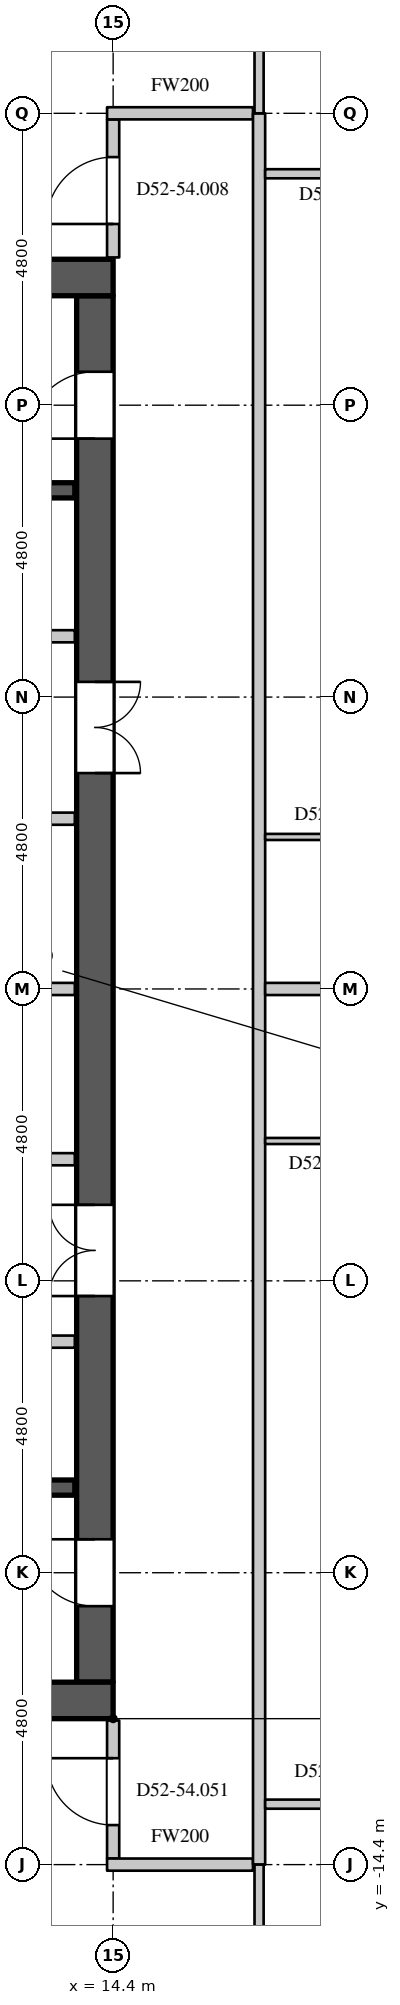
"""IFC4 building model, lengths in metres.
Left out: names, types, materials, properties, quantities, classifications, styles, units other than length and angle.
Written with IfcOpenShell. Run it as: python <this file> out.ifc"""

import sys

from ifc_helpers import new_model, si_unit, direction, frame, frame_2d, origin, place, context, subcontext, project, spatial, rectangle, extrude, element, fill, save


model = new_model("IFC4")
c1 = context("Model", 3, precision=1e-05, world=origin(), true_north=direction((0.0, 1.0)))
c2 = subcontext(c1, "Body", "Model", "MODEL_VIEW")
j1 = project(units=[si_unit("LENGTHUNIT", "METRE"), si_unit("PLANEANGLEUNIT", "RADIAN")], contexts=[c1])
p1 = place(None, origin())
s1 = spatial("IfcSite", under=j1, at=p1, CompositionType="ELEMENT")
p2 = place(p1, origin())
s2 = spatial("IfcBuilding", under=s1, at=p2, CompositionType="ELEMENT")
p3 = place(p2, frame((0.0, 0.0, 226.5)))
s3 = spatial("IfcBuildingStorey", under=s2, at=p3, CompositionType="ELEMENT", Elevation=226.5)
for number, where, z_axis, x_axis in (
    (1, (-14.4, 11.7, 0.0), (0.0, 0.0, 1.0), (1.0, 0.0, 0.0)),
    (2, (-14.4, -11.7, 0.0), (0.0, 0.0, 1.0), (1.0, 0.0, 0.0)),
):
    element("IfcWall", number, at=place(p3, frame(where, z_axis=z_axis, x_axis=x_axis)), inside=s3, PredefinedType="SHEAR", context=c2, shape_type="SweptSolid", body=[
        extrude(rectangle(XDim=28.8, YDim=0.6, at=frame_2d((14.4, 0.0))), origin(), (0.0, 0.0, 1.0), 4.2),
    ])
p4 = place(p3, frame((14.1, -11.4, 0.0), z_axis=(0.0, 0.0, 1.0), x_axis=(0.0, 1.0, 0.0)))
e3 = element("IfcWall", 3, at=p4, inside=s3, PredefinedType="SHEAR", context=c2, shape_type="SweptSolid", body=[
    extrude(rectangle(XDim=22.8, YDim=0.6, at=frame_2d((11.4, 0.0))), origin(), (0.0, 0.0, 1.0), 4.2),
])
p5 = place(p4, frame((20.45, 0.0, 0.0)))
e4 = element("IfcOpeningElement", 4, at=p5, cuts=e3, PredefinedType="OPENING", context=c2, shape_type="SweptSolid", body=[
    extrude(rectangle(XDim=1.1, YDim=2.2, at=frame_2d((0.55, 1.1))), frame((0.0, 0.31, 0.0), z_axis=(0.0, -1.0, 0.0), x_axis=(1.0, 0.0, 0.0)), (0.0, 0.0, 1.0), 0.62),
])
p6 = place(p4, frame((1.25, 0.0, 0.0)))
e5 = element("IfcOpeningElement", 5, at=p6, cuts=e3, PredefinedType="OPENING", context=c2, shape_type="SweptSolid", body=[
    extrude(rectangle(XDim=1.1, YDim=2.2, at=frame_2d((0.55, 1.1))), frame((0.0, 0.31, 0.0), z_axis=(0.0, -1.0, 0.0), x_axis=(1.0, 0.0, 0.0)), (0.0, 0.0, 1.0), 0.62),
])
p7 = place(p4, frame((14.95, 0.0, 0.0)))
e6 = element("IfcOpeningElement", 6, at=p7, cuts=e3, PredefinedType="OPENING", context=c2, shape_type="SweptSolid", body=[
    extrude(rectangle(XDim=1.5, YDim=2.4, at=frame_2d((0.75, 1.2))), frame((0.0, 0.31, 0.0), z_axis=(0.0, -1.0, 0.0), x_axis=(1.0, 0.0, 0.0)), (0.0, 0.0, 1.0), 0.62),
])
p8 = place(p4, frame((6.35, 0.0, 0.0)))
e7 = element("IfcOpeningElement", 7, at=p8, cuts=e3, PredefinedType="OPENING", context=c2, shape_type="SweptSolid", body=[
    extrude(rectangle(XDim=1.5, YDim=2.4, at=frame_2d((0.75, 1.2))), frame((0.0, 0.31, 0.0), z_axis=(0.0, -1.0, 0.0), x_axis=(1.0, 0.0, 0.0)), (0.0, 0.0, 1.0), 0.62),
])
p9 = place(p3, frame((-7.7, -5.8, 0.0), z_axis=(0.0, 0.0, 1.0), x_axis=(1.0, 0.0, 0.0)))
e8 = element("IfcWall", 8, at=p9, inside=s3, PredefinedType="PARTITIONING", context=c2, shape_type="SweptSolid", body=[
    extrude(rectangle(XDim=21.47, YDim=0.2, at=frame_2d((10.735, 0.0))), origin(), (0.0, 0.0, 1.0), 3.95),
])
p10 = place(p9, frame((6.15, 0.0, 0.0)))
e9 = element("IfcOpeningElement", 9, at=p10, cuts=e8, PredefinedType="OPENING", context=c2, shape_type="SweptSolid", body=[
    extrude(rectangle(XDim=0.9, YDim=2.2, at=frame_2d((0.45, 1.1))), frame((0.0, 0.11, 0.0), z_axis=(0.0, -1.0, 0.0), x_axis=(1.0, 0.0, 0.0)), (0.0, 0.0, 1.0), 0.22),
])
p11 = place(p9, frame((16.75, 0.0, 0.0)))
e10 = element("IfcOpeningElement", 10, at=p11, cuts=e8, PredefinedType="OPENING", context=c2, shape_type="SweptSolid", body=[
    extrude(rectangle(XDim=0.9, YDim=2.2, at=frame_2d((0.45, 1.1))), frame((0.0, 0.11, 0.0), z_axis=(0.0, -1.0, 0.0), x_axis=(1.0, 0.0, 0.0)), (0.0, 0.0, 1.0), 0.22),
])
p12 = place(p3, frame((-7.7, 5.8, 0.0), z_axis=(0.0, 0.0, 1.0), x_axis=(1.0, 0.0, 0.0)))
e11 = element("IfcWall", 11, at=p12, inside=s3, PredefinedType="PARTITIONING", context=c2, shape_type="SweptSolid", body=[
    extrude(rectangle(XDim=21.47, YDim=0.2, at=frame_2d((10.735, 0.0))), origin(), (0.0, 0.0, 1.0), 3.95),
])
p13 = place(p12, frame((3.45, 0.0, 0.0)))
e12 = element("IfcOpeningElement", 12, at=p13, cuts=e11, PredefinedType="OPENING", context=c2, shape_type="SweptSolid", body=[
    extrude(rectangle(XDim=0.9, YDim=2.2, at=frame_2d((0.45, 1.1))), frame((0.0, 0.11, 0.0), z_axis=(0.0, -1.0, 0.0), x_axis=(1.0, 0.0, 0.0)), (0.0, 0.0, 1.0), 0.22),
])
p14 = place(p12, frame((9.9, 0.0, 0.0)))
e13 = element("IfcOpeningElement", 13, at=p14, cuts=e11, PredefinedType="OPENING", context=c2, shape_type="SweptSolid", body=[
    extrude(rectangle(XDim=0.9, YDim=2.2, at=frame_2d((0.45, 1.1))), frame((0.0, 0.11, 0.0), z_axis=(0.0, -1.0, 0.0), x_axis=(1.0, 0.0, 0.0)), (0.0, 0.0, 1.0), 0.22),
])
p15 = place(p12, frame((16.75, 0.0, 0.0)))
e14 = element("IfcOpeningElement", 14, at=p15, cuts=e11, PredefinedType="OPENING", context=c2, shape_type="SweptSolid", body=[
    extrude(rectangle(XDim=0.9, YDim=2.2, at=frame_2d((0.45, 1.1))), frame((0.0, 0.11, 0.0), z_axis=(0.0, -1.0, 0.0), x_axis=(1.0, 0.0, 0.0)), (0.0, 0.0, 1.0), 0.22),
])
p16 = place(p3, frame((14.4, -14.3, 0.0), z_axis=(0.0, 0.0, 1.0), x_axis=(0.0, 1.0, 0.0)))
e15 = element("IfcWall", 15, at=p16, inside=s3, PredefinedType="PARTITIONING", context=c2, shape_type="SweptSolid", body=[
    extrude(rectangle(XDim=2.27, YDim=0.2, at=frame_2d((1.135, 0.0))), origin(), (0.0, 0.0, 1.0), 3.95),
])
p17 = place(p16, frame((0.55, 0.0, 0.0)))
e16 = element("IfcOpeningElement", 16, at=p17, cuts=e15, PredefinedType="OPENING", context=c2, shape_type="SweptSolid", body=[
    extrude(rectangle(XDim=1.1, YDim=2.4, at=frame_2d((0.55, 1.2))), frame((0.0, 0.11, 0.0), z_axis=(0.0, -1.0, 0.0), x_axis=(1.0, 0.0, 0.0)), (0.0, 0.0, 1.0), 0.22),
])
p18 = place(p3, frame((14.3, -14.4, 0.0), z_axis=(0.0, 0.0, 1.0), x_axis=(1.0, 0.0, 0.0)))
e17 = element("IfcWall", 17, at=p18, inside=s3, PredefinedType="PARTITIONING", context=c2, shape_type="SweptSolid", body=[
    extrude(rectangle(XDim=2.4, YDim=0.2, at=frame_2d((1.2, 0.0))), origin(), (0.0, 0.0, 1.0), 3.95),
])
p19 = place(p3, frame((14.4, 12.03, 0.0), z_axis=(0.0, 0.0, 1.0), x_axis=(0.0, 1.0, 0.0)))
e18 = element("IfcWall", 18, at=p19, inside=s3, PredefinedType="PARTITIONING", context=c2, shape_type="SweptSolid", body=[
    extrude(rectangle(XDim=2.27, YDim=0.2, at=frame_2d((1.135, 0.0))), origin(), (0.0, 0.0, 1.0), 3.95),
])
p20 = place(p19, frame((0.55, 0.0, 0.0)))
e19 = element("IfcOpeningElement", 19, at=p20, cuts=e18, PredefinedType="OPENING", context=c2, shape_type="SweptSolid", body=[
    extrude(rectangle(XDim=1.1, YDim=2.4, at=frame_2d((0.55, 1.2))), frame((0.0, 0.11, 0.0), z_axis=(0.0, -1.0, 0.0), x_axis=(1.0, 0.0, 0.0)), (0.0, 0.0, 1.0), 0.22),
])
p21 = place(p3, frame((14.3, 14.4, 0.0), z_axis=(0.0, 0.0, 1.0), x_axis=(1.0, 0.0, 0.0)))
e20 = element("IfcWall", 20, at=p21, inside=s3, PredefinedType="PARTITIONING", context=c2, shape_type="SweptSolid", body=[
    extrude(rectangle(XDim=2.4, YDim=0.2, at=frame_2d((1.2, 0.0))), origin(), (0.0, 0.0, 1.0), 3.95),
])
p22 = place(p3, frame((16.8, -14.4, 0.0), z_axis=(0.0, 0.0, 1.0), x_axis=(0.0, 1.0, 0.0)))
e21 = element("IfcWall", 21, at=p22, inside=s3, PredefinedType="PARTITIONING", context=c2, shape_type="SweptSolid", body=[
    extrude(rectangle(XDim=28.8, YDim=0.2, at=frame_2d((14.4, 0.0))), origin(), (0.0, 0.0, 1.0), 3.95),
])
p23 = place(p3, frame((16.8, -19.828, 0.0), z_axis=(0.0, 0.0, 1.0), x_axis=(0.0, 1.0, 0.0)))
e22 = element("IfcWall", 22, at=p23, inside=s3, PredefinedType="PARTITIONING", context=c2, shape_type="SweptSolid", body=[
    extrude(rectangle(XDim=5.428, YDim=0.15, at=frame_2d((2.714, 0.0))), origin(), (0.0, 0.0, 1.0), 3.95),
])
p24 = place(p23, frame((3.0, 0.0, 0.0)))
e23 = element("IfcOpeningElement", 23, at=p24, cuts=e22, PredefinedType="OPENING", context=c2, shape_type="SweptSolid", body=[
    extrude(rectangle(XDim=0.95, YDim=2.2, at=frame_2d((0.475, 1.1))), frame((0.0, 0.085, 0.0), z_axis=(0.0, -1.0, 0.0), x_axis=(1.0, 0.0, 0.0)), (0.0, 0.0, 1.0), 0.17),
])
p25 = place(p3, frame((16.9, -13.406, 0.0), z_axis=(0.0, 0.0, 1.0), x_axis=(1.0, 0.0, 0.0)))
e24 = element("IfcWall", 24, at=p25, inside=s3, PredefinedType="PARTITIONING", context=c2, shape_type="SweptSolid", body=[
    extrude(rectangle(XDim=8.324, YDim=0.15, at=frame_2d((4.162, 0.0))), origin(), (0.0, 0.0, 1.0), 3.95),
])
p26 = place(p25, frame((1.3, 0.0, 0.0)))
e25 = element("IfcOpeningElement", 25, at=p26, cuts=e24, PredefinedType="OPENING", context=c2, shape_type="SweptSolid", body=[
    extrude(rectangle(XDim=0.95, YDim=2.2, at=frame_2d((0.475, 1.1))), frame((0.0, 0.085, 0.0), z_axis=(0.0, -1.0, 0.0), x_axis=(1.0, 0.0, 0.0)), (0.0, 0.0, 1.0), 0.17),
])
p27 = place(p25, frame((5.65, 0.0, 0.0)))
e26 = element("IfcOpeningElement", 26, at=p27, cuts=e24, PredefinedType="OPENING", context=c2, shape_type="SweptSolid", body=[
    extrude(rectangle(XDim=0.95, YDim=2.2, at=frame_2d((0.475, 1.1))), frame((0.0, 0.085, 0.0), z_axis=(0.0, -1.0, 0.0), x_axis=(1.0, 0.0, 0.0)), (0.0, 0.0, 1.0), 0.17),
])
p28 = place(p3, frame((16.9, 13.406, 0.0), z_axis=(0.0, 0.0, 1.0), x_axis=(1.0, 0.0, 0.0)))
e27 = element("IfcWall", 27, at=p28, inside=s3, PredefinedType="PARTITIONING", context=c2, shape_type="SweptSolid", body=[
    extrude(rectangle(XDim=8.324, YDim=0.15, at=frame_2d((4.162, 0.0))), origin(), (0.0, 0.0, 1.0), 3.95),
])
p29 = place(p28, frame((1.2, 0.0, 0.0)))
e28 = element("IfcOpeningElement", 28, at=p29, cuts=e27, PredefinedType="OPENING", context=c2, shape_type="SweptSolid", body=[
    extrude(rectangle(XDim=0.95, YDim=2.2, at=frame_2d((0.475, 1.1))), frame((0.0, 0.085, 0.0), z_axis=(0.0, -1.0, 0.0), x_axis=(1.0, 0.0, 0.0)), (0.0, 0.0, 1.0), 0.17),
])
p30 = place(p28, frame((5.5, 0.0, 0.0)))
e29 = element("IfcOpeningElement", 29, at=p30, cuts=e27, PredefinedType="OPENING", context=c2, shape_type="SweptSolid", body=[
    extrude(rectangle(XDim=0.95, YDim=2.2, at=frame_2d((0.475, 1.1))), frame((0.0, 0.085, 0.0), z_axis=(0.0, -1.0, 0.0), x_axis=(1.0, 0.0, 0.0)), (0.0, 0.0, 1.0), 0.17),
])
p31 = place(p3, frame((16.8, 14.4, 0.0), z_axis=(0.0, 0.0, 1.0), x_axis=(0.0, 1.0, 0.0)))
e30 = element("IfcWall", 30, at=p31, inside=s3, PredefinedType="PARTITIONING", context=c2, shape_type="SweptSolid", body=[
    extrude(rectangle(XDim=5.428, YDim=0.15, at=frame_2d((2.714, 0.0))), origin(), (0.0, 0.0, 1.0), 3.95),
])
p32 = place(p31, frame((1.35, 0.0, 0.0)))
e31 = element("IfcOpeningElement", 31, at=p32, cuts=e30, PredefinedType="OPENING", context=c2, shape_type="SweptSolid", body=[
    extrude(rectangle(XDim=0.95, YDim=2.2, at=frame_2d((0.475, 1.1))), frame((0.0, 0.085, 0.0), z_axis=(0.0, -1.0, 0.0), x_axis=(1.0, 0.0, 0.0)), (0.0, 0.0, 1.0), 0.17),
])
p33 = place(p3, frame((16.9, 0.0, 0.0), z_axis=(0.0, 0.0, 1.0), x_axis=(1.0, 0.0, 0.0)))
e32 = element("IfcWall", 32, at=p33, inside=s3, PredefinedType="PARTITIONING", context=c2, shape_type="SweptSolid", body=[
    extrude(rectangle(XDim=9.555, YDim=0.2, at=frame_2d((4.778, 0.0))), origin(), (0.0, 0.0, 1.0), 3.95),
])
p34 = place(p3, frame((7.8, -2.8, 0.0), z_axis=(0.0, 0.0, 1.0), x_axis=(1.0, 0.0, 0.0)))
e33 = element("IfcWall", 33, at=p34, inside=s3, PredefinedType="PARTITIONING", context=c2, shape_type="SweptSolid", body=[
    extrude(rectangle(XDim=5.97, YDim=0.2, at=frame_2d((2.985, 0.0))), origin(), (0.0, 0.0, 1.0), 3.95),
])
p35 = place(p34, frame((2.55, 0.0, 0.0)))
e34 = element("IfcOpeningElement", 34, at=p35, cuts=e33, PredefinedType="OPENING", context=c2, shape_type="SweptSolid", body=[
    extrude(rectangle(XDim=0.9, YDim=2.2, at=frame_2d((0.45, 1.1))), frame((0.0, 0.11, 0.0), z_axis=(0.0, -1.0, 0.0), x_axis=(1.0, 0.0, 0.0)), (0.0, 0.0, 1.0), 0.22),
])
p36 = place(p3, frame((7.8, 0.0, 0.0), z_axis=(0.0, 0.0, 1.0), x_axis=(1.0, 0.0, 0.0)))
e35 = element("IfcWall", 35, at=p36, inside=s3, PredefinedType="PARTITIONING", context=c2, shape_type="SweptSolid", body=[
    extrude(rectangle(XDim=5.97, YDim=0.2, at=frame_2d((2.985, 0.0))), origin(), (0.0, 0.0, 1.0), 3.95),
])
p37 = place(p3, frame((10.42, 2.8, 0.0), z_axis=(0.0, 0.0, 1.0), x_axis=(1.0, 0.0, 0.0)))
e36 = element("IfcWall", 36, at=p37, inside=s3, PredefinedType="PARTITIONING", context=c2, shape_type="SweptSolid", body=[
    extrude(rectangle(XDim=3.35, YDim=0.2, at=frame_2d((1.675, 0.0))), origin(), (0.0, 0.0, 1.0), 3.95),
])
p38 = place(p37, frame((1.35, 0.0, 0.0)))
e37 = element("IfcOpeningElement", 37, at=p38, cuts=e36, PredefinedType="OPENING", context=c2, shape_type="SweptSolid", body=[
    extrude(rectangle(XDim=0.6, YDim=2.0, at=frame_2d((0.3, 1.0))), frame((0.0, 0.11, 0.0), z_axis=(0.0, -1.0, 0.0), x_axis=(1.0, 0.0, 0.0)), (0.0, 0.0, 1.0), 0.22),
])
for number, where, z_axis, x_axis in (
    (38, (5.525, -8.2, 0.0), (0.0, 0.0, 1.0), (1.0, 0.0, 0.0)),
    (39, (5.525, 8.2, 0.0), (0.0, 0.0, 1.0), (1.0, 0.0, 0.0)),
):
    element("IfcWall", number, at=place(p3, frame(where, z_axis=z_axis, x_axis=x_axis)), inside=s3, PredefinedType="SHEAR", context=c2, shape_type="SweptSolid", body=[
        extrude(rectangle(XDim=8.245, YDim=0.25, at=frame_2d((4.123, 0.0))), origin(), (0.0, 0.0, 1.0), 3.95),
    ])
p39 = place(p3, frame((16.9, -2.5, 0.0), z_axis=(0.0, 0.0, 1.0), x_axis=(1.0, 0.0, 0.0)))
e40 = element("IfcWall", 40, at=p39, inside=s3, PredefinedType="PARTITIONING", context=c2, shape_type="SweptSolid", body=[
    extrude(rectangle(XDim=3.675, YDim=0.1, at=frame_2d((1.837, 0.0))), origin(), (0.0, 0.0, 1.0), 3.95),
])
p40 = place(p39, frame((1.35, 0.0, 0.0)))
e41 = element("IfcOpeningElement", 41, at=p40, cuts=e40, PredefinedType="OPENING", context=c2, shape_type="SweptSolid", body=[
    extrude(rectangle(XDim=0.9, YDim=2.2, at=frame_2d((0.45, 1.1))), frame((0.0, 0.06, 0.0), z_axis=(0.0, -1.0, 0.0), x_axis=(1.0, 0.0, 0.0)), (0.0, 0.0, 1.0), 0.12),
])
p41 = place(p3, frame((16.9, 2.5, 0.0), z_axis=(0.0, 0.0, 1.0), x_axis=(1.0, 0.0, 0.0)))
e42 = element("IfcWall", 42, at=p41, inside=s3, PredefinedType="PARTITIONING", context=c2, shape_type="SweptSolid", body=[
    extrude(rectangle(XDim=3.225, YDim=0.1, at=frame_2d((1.613, 0.0))), origin(), (0.0, 0.0, 1.0), 3.95),
])
p42 = place(p41, frame((1.15, 0.0, 0.0)))
e43 = element("IfcOpeningElement", 43, at=p42, cuts=e42, PredefinedType="OPENING", context=c2, shape_type="SweptSolid", body=[
    extrude(rectangle(XDim=0.9, YDim=2.2, at=frame_2d((0.45, 1.1))), frame((0.0, 0.06, 0.0), z_axis=(0.0, -1.0, 0.0), x_axis=(1.0, 0.0, 0.0)), (0.0, 0.0, 1.0), 0.12),
])
p43 = place(p5, origin())
e44 = element("IfcDoor", 44, at=p43, inside=s3, OperationType="SINGLE_SWING_LEFT", PredefinedType="DOOR", context=c2, shape_type="SweptSolid", body=[
    extrude(rectangle(XDim=1.1, YDim=2.2, at=frame_2d((0.55, 1.1))), frame((0.0, 0.295, 0.0), z_axis=(0.0, -1.0, 0.0), x_axis=(1.0, 0.0, 0.0)), (0.0, 0.0, 1.0), 0.05),
])
fill(e4, e44)
p44 = place(p6, origin())
e45 = element("IfcDoor", 45, at=p44, inside=s3, OperationType="SINGLE_SWING_RIGHT", PredefinedType="DOOR", context=c2, shape_type="SweptSolid", body=[
    extrude(rectangle(XDim=1.1, YDim=2.2, at=frame_2d((0.55, 1.1))), frame((0.0, 0.295, 0.0), z_axis=(0.0, -1.0, 0.0), x_axis=(1.0, 0.0, 0.0)), (0.0, 0.0, 1.0), 0.05),
])
fill(e5, e45)
p45 = place(p7, origin())
e46 = element("IfcDoor", 46, at=p45, inside=s3, OperationType="DOUBLE_DOOR_SINGLE_SWING", PredefinedType="DOOR", context=c2, shape_type="SweptSolid", body=[
    extrude(rectangle(XDim=1.5, YDim=2.4, at=frame_2d((0.75, 1.2))), frame((0.0, -0.245, 0.0), z_axis=(0.0, -1.0, 0.0), x_axis=(1.0, 0.0, 0.0)), (0.0, 0.0, 1.0), 0.05),
])
fill(e6, e46)
p46 = place(p8, origin())
e47 = element("IfcDoor", 47, at=p46, inside=s3, OperationType="DOUBLE_DOOR_SINGLE_SWING", PredefinedType="DOOR", context=c2, shape_type="SweptSolid", body=[
    extrude(rectangle(XDim=1.5, YDim=2.4, at=frame_2d((0.75, 1.2))), frame((0.0, 0.295, 0.0), z_axis=(0.0, -1.0, 0.0), x_axis=(1.0, 0.0, 0.0)), (0.0, 0.0, 1.0), 0.05),
])
fill(e7, e47)
p47 = place(p20, origin())
e48 = element("IfcDoor", 48, at=p47, inside=s3, OperationType="SINGLE_SWING_LEFT", PredefinedType="DOOR", context=c2, shape_type="SweptSolid", body=[
    extrude(rectangle(XDim=1.1, YDim=2.4, at=frame_2d((0.55, 1.2))), frame((0.0, 0.025, 0.0), z_axis=(0.0, -1.0, 0.0), x_axis=(1.0, 0.0, 0.0)), (0.0, 0.0, 1.0), 0.05),
])
fill(e19, e48)
p48 = place(p17, origin())
e49 = element("IfcDoor", 49, at=p48, inside=s3, OperationType="SINGLE_SWING_RIGHT", PredefinedType="DOOR", context=c2, shape_type="SweptSolid", body=[
    extrude(rectangle(XDim=1.1, YDim=2.4, at=frame_2d((0.55, 1.2))), frame((0.0, 0.025, 0.0), z_axis=(0.0, -1.0, 0.0), x_axis=(1.0, 0.0, 0.0)), (0.0, 0.0, 1.0), 0.05),
])
fill(e16, e49)
save(model, sys.argv[1])
